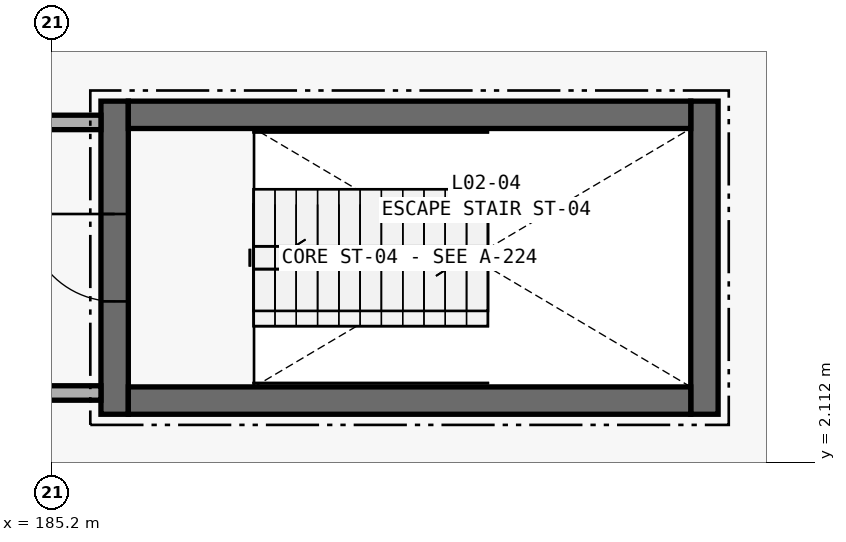
"""IFC4 building model, lengths in metres.
Left out: names, types, materials, properties, quantities, classifications, styles, units other than length and angle.
Written with IfcOpenShell. Run it as: python <this file> out.ifc"""

import sys

from ifc_helpers import new_model, si_unit, direction, frame, frame_2d, origin, place, context, subcontext, project, spatial, rectangle, extrude, element, fill, save


model = new_model("IFC4")
c1 = context("Model", 3, precision=1e-05, world=origin(), true_north=direction((0.0, 1.0)))
c2 = subcontext(c1, "Body", "Model", "MODEL_VIEW")
j1 = project(units=[si_unit("LENGTHUNIT", "METRE"), si_unit("PLANEANGLEUNIT", "RADIAN")], contexts=[c1])
p1 = place(None, origin())
s1 = spatial("IfcSite", under=j1, at=p1, CompositionType="ELEMENT")
p2 = place(p1, origin())
s2 = spatial("IfcBuilding", under=s1, at=p2, CompositionType="ELEMENT")
p3 = place(p2, frame((0.0, 0.0, 9.0)))
s3 = spatial("IfcBuildingStorey", under=s2, at=p3, CompositionType="ELEMENT", Elevation=9.0)
p4 = place(p3, frame((186.02, 2.74, 0.0), z_axis=(0.0, 0.0, 1.0), x_axis=(0.0, 1.0, 0.0)))
e1 = element("IfcWall", 1, at=p4, inside=s3, PredefinedType="SHEAR", context=c2, shape_type="SweptSolid", body=[
    extrude(rectangle(XDim=4.12, YDim=0.36, at=frame_2d((2.06, 0.0))), origin(), (0.0, 0.0, 1.0), 7.82),
])
p5 = place(p4, frame((1.485, 0.0, 0.0)))
e2 = element("IfcOpeningElement", 2, at=p5, cuts=e1, PredefinedType="OPENING", context=c2, shape_type="SweptSolid", body=[
    extrude(rectangle(XDim=1.15, YDim=2.15, at=frame_2d((0.575, 1.075))), frame((0.0, 0.195, 0.0), z_axis=(0.0, -1.0, 0.0), x_axis=(1.0, 0.0, 0.0)), (0.0, 0.0, 1.0), 0.39),
])
p6 = place(p3, frame((193.78, 2.74, 0.0), z_axis=(0.0, 0.0, 1.0), x_axis=(0.0, 1.0, 0.0)))
e3 = element("IfcWall", 3, at=p6, inside=s3, PredefinedType="SHEAR", context=c2, shape_type="SweptSolid", body=[
    extrude(rectangle(XDim=4.12, YDim=0.36, at=frame_2d((2.06, 0.0))), origin(), (0.0, 0.0, 1.0), 7.82),
])
for number, where, z_axis, x_axis in (
    (4, (186.2, 6.68, 0.0), (0.0, 0.0, 1.0), (1.0, 0.0, 0.0)),
    (5, (186.2, 2.92, 0.0), (0.0, 0.0, 1.0), (1.0, 0.0, 0.0)),
):
    element("IfcWall", number, at=place(p3, frame(where, z_axis=z_axis, x_axis=x_axis)), inside=s3, PredefinedType="SHEAR", context=c2, shape_type="SweptSolid", body=[
        extrude(rectangle(XDim=7.4, YDim=0.36, at=frame_2d((3.7, 0.0))), origin(), (0.0, 0.0, 1.0), 7.82),
    ])
p7 = place(p3, frame((181.825, 3.02, 0.0), z_axis=(0.0, 0.0, 1.0), x_axis=(1.0, 0.0, 0.0)))
e6 = element("IfcWall", 6, at=p7, inside=s3, PredefinedType="PARTITIONING", context=c2, shape_type="SweptSolid", body=[
    extrude(rectangle(XDim=4.015, YDim=0.19, at=frame_2d((2.008, 0.0))), origin(), (0.0, 0.0, 1.0), 6.7),
])
p8 = place(p3, frame((184.685, 6.58, 0.0), z_axis=(0.0, 0.0, 1.0), x_axis=(1.0, 0.0, 0.0)))
e7 = element("IfcWall", 7, at=p8, inside=s3, PredefinedType="PARTITIONING", context=c2, shape_type="SweptSolid", body=[
    extrude(rectangle(XDim=1.155, YDim=0.19, at=frame_2d((0.578, 0.0))), origin(), (0.0, 0.0, 1.0), 6.7),
])
p9 = place(p5, origin())
e8 = element("IfcDoor", 8, at=p9, inside=s3, OperationType="SINGLE_SWING_RIGHT", PredefinedType="DOOR", context=c2, shape_type="SweptSolid", body=[
    extrude(rectangle(XDim=1.15, YDim=2.15, at=frame_2d((0.575, 1.075))), frame((0.0, 0.025, 0.0), z_axis=(0.0, -1.0, 0.0), x_axis=(1.0, 0.0, 0.0)), (0.0, 0.0, 1.0), 0.05),
])
fill(e2, e8)
save(model, sys.argv[1])
